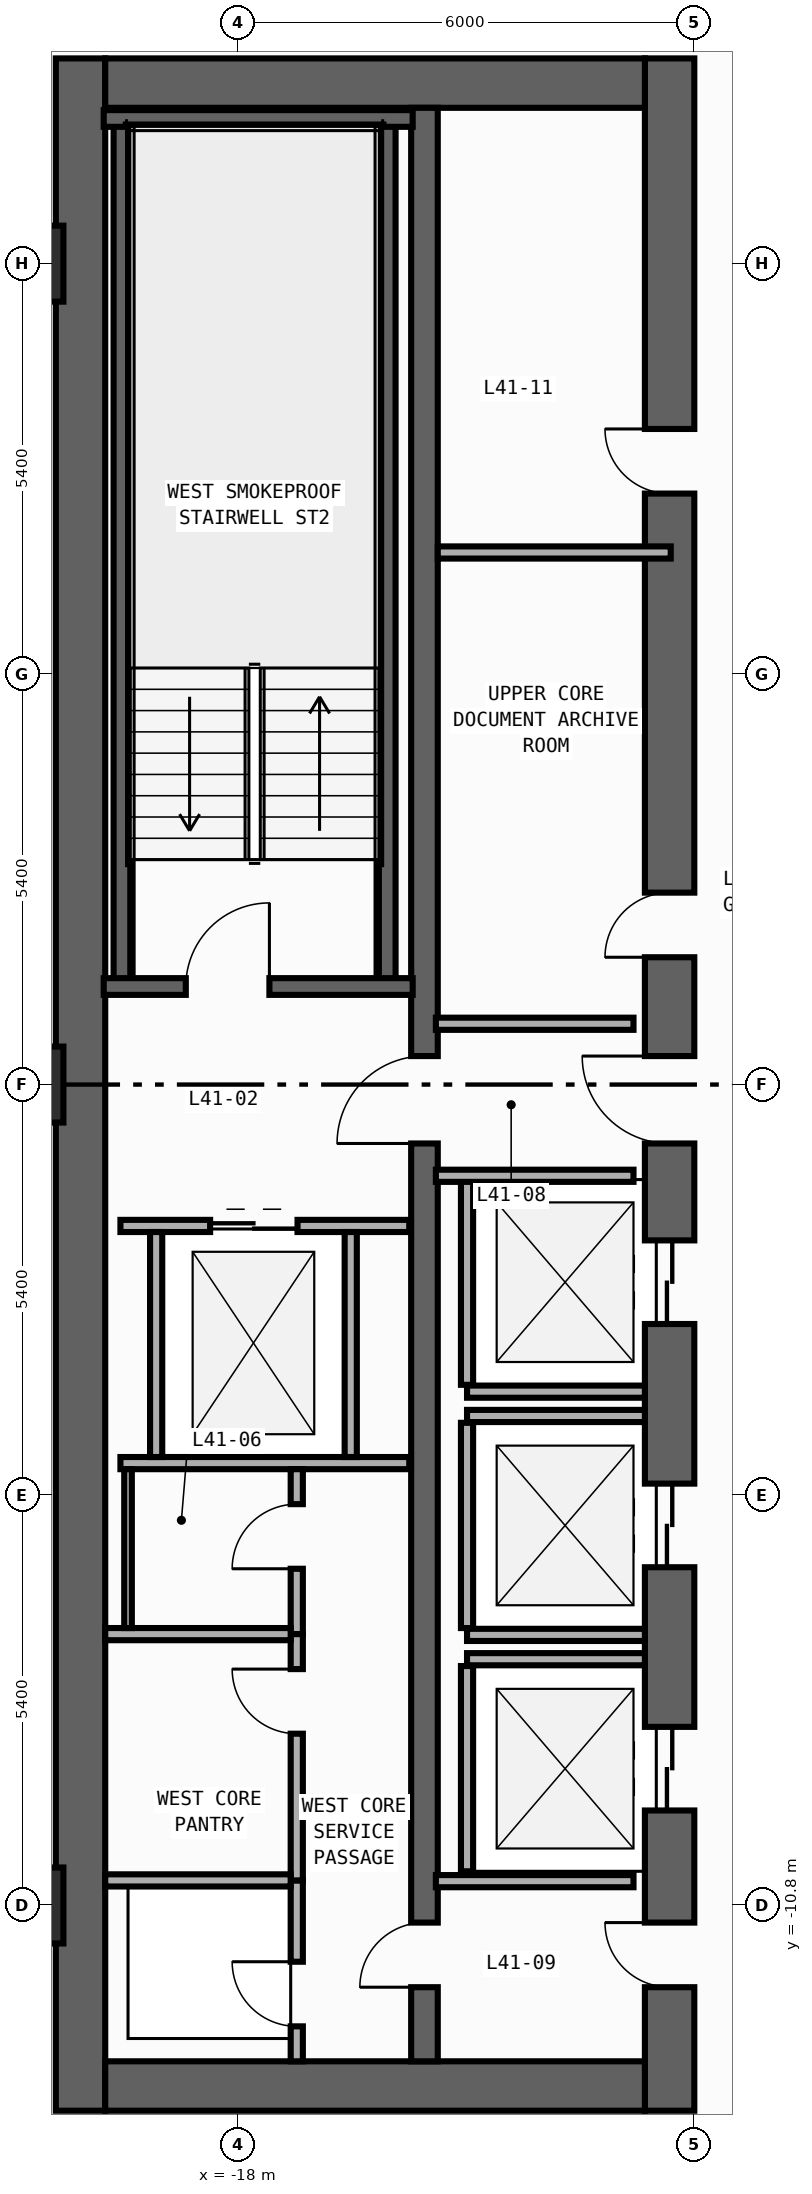
"""IFC4 building model, lengths in metres.
Left out: names, types, materials, properties, quantities, classifications, styles, units other than length and angle.
Written with IfcOpenShell. Run it as: python <this file> out.ifc"""

import sys

from ifc_helpers import new_model, si_unit, direction, frame, frame_2d, origin, origin_2d, place, context, subcontext, project, spatial, rectangle, extrude, element, fill, save


model = new_model("IFC4")
c1 = context("Model", 3, precision=1e-05, world=origin(), true_north=direction((0.0, 1.0)))
c2 = subcontext(c1, "Body", "Model", "MODEL_VIEW")
j1 = project(units=[si_unit("LENGTHUNIT", "METRE"), si_unit("PLANEANGLEUNIT", "RADIAN")], contexts=[c1])
p1 = place(None, origin())
s1 = spatial("IfcSite", under=j1, at=p1, CompositionType="ELEMENT")
p2 = place(p1, origin())
s2 = spatial("IfcBuilding", under=s1, at=p2, CompositionType="ELEMENT")
p3 = place(p2, frame((0.0, 0.0, 180.2)))
s3 = spatial("IfcBuildingStorey", under=s2, at=p3, CompositionType="ELEMENT", Elevation=180.2)
p4 = place(p3, frame((-20.075, -13.5, 0.0), z_axis=(0.0, 0.0, 1.0), x_axis=(0.0, 1.0, 0.0)))
e1 = element("IfcWall", 1, at=p4, inside=s3, PredefinedType="SHEAR", context=c2, shape_type="SweptSolid", body=[
    extrude(rectangle(XDim=27.0, YDim=0.65, at=frame_2d((13.5, 0.0))), origin(), (0.0, 0.0, 1.0), 3.54),
])
p5 = place(p3, frame((-12.325, -13.5, 0.0), z_axis=(0.0, 0.0, 1.0), x_axis=(0.0, 1.0, 0.0)))
e2 = element("IfcWall", 2, at=p5, inside=s3, PredefinedType="SHEAR", context=c2, shape_type="SweptSolid", body=[
    extrude(rectangle(XDim=27.0, YDim=0.65, at=frame_2d((13.5, 0.0))), origin(), (0.0, 0.0, 1.0), 3.54),
])
p6 = place(p5, frame((10.35, 0.0, 0.0)))
e3 = element("IfcOpeningElement", 3, at=p6, cuts=e2, PredefinedType="OPENING", context=c2, shape_type="SweptSolid", body=[
    extrude(rectangle(XDim=1.1, YDim=2.2, at=frame_2d((0.55, 1.1))), frame((0.0, 0.335, 0.0), z_axis=(0.0, -1.0, 0.0), x_axis=(1.0, 0.0, 0.0)), (0.0, 0.0, 1.0), 0.67),
])
p7 = place(p5, frame((7.15, 0.0, 0.0)))
e4 = element("IfcOpeningElement", 4, at=p7, cuts=e2, PredefinedType="OPENING", context=c2, shape_type="SweptSolid", body=[
    extrude(rectangle(XDim=1.1, YDim=2.2, at=frame_2d((0.55, 1.1))), frame((0.0, 0.335, 0.0), z_axis=(0.0, -1.0, 0.0), x_axis=(1.0, 0.0, 0.0)), (0.0, 0.0, 1.0), 0.67),
])
p8 = place(p5, frame((3.95, 0.0, 0.0)))
e5 = element("IfcOpeningElement", 5, at=p8, cuts=e2, PredefinedType="OPENING", context=c2, shape_type="SweptSolid", body=[
    extrude(rectangle(XDim=1.1, YDim=2.2, at=frame_2d((0.55, 1.1))), frame((0.0, 0.335, 0.0), z_axis=(0.0, -1.0, 0.0), x_axis=(1.0, 0.0, 0.0)), (0.0, 0.0, 1.0), 0.67),
])
p9 = place(p5, frame((15.175, 0.0, 0.0)))
e6 = element("IfcOpeningElement", 6, at=p9, cuts=e2, PredefinedType="OPENING", context=c2, shape_type="SweptSolid", body=[
    extrude(rectangle(XDim=0.85, YDim=2.1, at=frame_2d((0.425, 1.05))), frame((0.0, 0.335, 0.0), z_axis=(0.0, -1.0, 0.0), x_axis=(1.0, 0.0, 0.0)), (0.0, 0.0, 1.0), 0.67),
])
p10 = place(p5, frame((21.275, 0.0, 0.0)))
e7 = element("IfcOpeningElement", 7, at=p10, cuts=e2, PredefinedType="OPENING", context=c2, shape_type="SweptSolid", body=[
    extrude(rectangle(XDim=0.85, YDim=2.1, at=frame_2d((0.425, 1.05))), frame((0.0, 0.335, 0.0), z_axis=(0.0, -1.0, 0.0), x_axis=(1.0, 0.0, 0.0)), (0.0, 0.0, 1.0), 0.67),
])
p11 = place(p5, frame((12.725, 0.0, 0.0)))
e8 = element("IfcOpeningElement", 8, at=p11, cuts=e2, PredefinedType="OPENING", context=c2, shape_type="SweptSolid", body=[
    extrude(rectangle(XDim=1.15, YDim=2.2, at=frame_2d((0.575, 1.1))), frame((0.0, 0.335, 0.0), z_axis=(0.0, -1.0, 0.0), x_axis=(1.0, 0.0, 0.0)), (0.0, 0.0, 1.0), 0.67),
])
p12 = place(p5, frame((1.625, 0.0, 0.0)))
e9 = element("IfcOpeningElement", 9, at=p12, cuts=e2, PredefinedType="OPENING", context=c2, shape_type="SweptSolid", body=[
    extrude(rectangle(XDim=0.85, YDim=2.1, at=frame_2d((0.425, 1.05))), frame((0.0, 0.335, 0.0), z_axis=(0.0, -1.0, 0.0), x_axis=(1.0, 0.0, 0.0)), (0.0, 0.0, 1.0), 0.67),
])
for number, where, z_axis, x_axis in (
    (10, (-19.75, -13.175, 0.0), (0.0, 0.0, 1.0), (1.0, 0.0, 0.0)),
    (11, (-19.75, 13.175, 0.0), (0.0, 0.0, 1.0), (1.0, 0.0, 0.0)),
):
    element("IfcWall", number, at=place(p3, frame(where, z_axis=z_axis, x_axis=x_axis)), inside=s3, PredefinedType="SHEAR", context=c2, shape_type="SweptSolid", body=[
        extrude(rectangle(XDim=7.1, YDim=0.65, at=frame_2d((3.55, 0.0))), origin(), (0.0, 0.0, 1.0), 3.54),
    ])
p13 = place(p3, frame((-15.55, -12.85, 0.0), z_axis=(0.0, 0.0, 1.0), x_axis=(0.0, 1.0, 0.0)))
e12 = element("IfcWall", 12, at=p13, inside=s3, PredefinedType="SHEAR", context=c2, shape_type="SweptSolid", body=[
    extrude(rectangle(XDim=25.7, YDim=0.35, at=frame_2d((12.85, 0.0))), origin(), (0.0, 0.0, 1.0), 3.54),
])
p14 = place(p13, frame((12.075, 0.0, 0.0)))
e13 = element("IfcOpeningElement", 13, at=p14, cuts=e12, PredefinedType="OPENING", context=c2, shape_type="SweptSolid", body=[
    extrude(rectangle(XDim=1.15, YDim=2.2, at=frame_2d((0.575, 1.1))), frame((0.0, 0.185, 0.0), z_axis=(0.0, -1.0, 0.0), x_axis=(1.0, 0.0, 0.0)), (0.0, 0.0, 1.0), 0.37),
])
p15 = place(p13, frame((0.975, 0.0, 0.0)))
e14 = element("IfcOpeningElement", 14, at=p15, cuts=e12, PredefinedType="OPENING", context=c2, shape_type="SweptSolid", body=[
    extrude(rectangle(XDim=0.85, YDim=2.1, at=frame_2d((0.425, 1.05))), frame((0.0, 0.185, 0.0), z_axis=(0.0, -1.0, 0.0), x_axis=(1.0, 0.0, 0.0)), (0.0, 0.0, 1.0), 0.37),
])
for number, where, z_axis, x_axis in (
    (15, (-16.04, 1.29, 0.0), (0.0, 0.0, 1.0), (0.0, 1.0, 0.0)),
    (16, (-19.53, 1.29, 0.0), (0.0, 0.0, 1.0), (0.0, 1.0, 0.0)),
):
    element("IfcWall", number, at=place(p3, frame(where, z_axis=z_axis, x_axis=x_axis)), inside=s3, PredefinedType="SHEAR", context=c2, shape_type="SweptSolid", body=[
        extrude(rectangle(XDim=11.42, YDim=0.22, at=frame_2d((5.71, 0.0))), origin(), (0.0, 0.0, 1.0), 3.54),
    ])
p16 = place(p3, frame((-19.77, 12.71, 0.0), z_axis=(0.0, 0.0, 1.0), x_axis=(1.0, 0.0, 0.0)))
e17 = element("IfcWall", 17, at=p16, inside=s3, PredefinedType="SHEAR", context=c2, shape_type="SweptSolid", body=[
    extrude(rectangle(XDim=4.065, YDim=0.22, at=frame_2d((2.032, 0.0))), origin(), (0.0, 0.0, 1.0), 3.54),
])
p17 = place(p3, frame((-19.77, 1.29, 0.0), z_axis=(0.0, 0.0, 1.0), x_axis=(1.0, 0.0, 0.0)))
e18 = element("IfcWall", 18, at=p17, inside=s3, PredefinedType="SHEAR", context=c2, shape_type="SweptSolid", body=[
    extrude(rectangle(XDim=4.065, YDim=0.22, at=frame_2d((2.032, 0.0))), origin(), (0.0, 0.0, 1.0), 3.54),
])
p18 = place(p17, frame((1.08, 0.0, 0.0)))
e19 = element("IfcOpeningElement", 19, at=p18, cuts=e18, PredefinedType="OPENING", context=c2, shape_type="SweptSolid", body=[
    extrude(rectangle(XDim=1.1, YDim=2.2, at=frame_2d((0.55, 1.1))), frame((0.0, 0.12, 0.0), z_axis=(0.0, -1.0, 0.0), x_axis=(1.0, 0.0, 0.0)), (0.0, 0.0, 1.0), 0.24),
])
for number, where, z_axis, x_axis in (
    (20, (-20.8, -10.8, 0.0), (0.0, 0.0, 1.0), (1.0, 0.0, 0.0)),
    (21, (-20.8, 0.0, 0.0), (0.0, 0.0, 1.0), (1.0, 0.0, 0.0)),
    (22, (-20.8, 10.8, 0.0), (0.0, 0.0, 1.0), (1.0, 0.0, 0.0)),
):
    element("IfcColumn", number, at=place(p3, frame(where, z_axis=z_axis, x_axis=x_axis)), inside=s3, PredefinedType="COLUMN", context=c2, shape_type="SweptSolid", body=[
        extrude(rectangle(XDim=1.0, YDim=1.0, at=origin_2d()), origin(), (0.0, 0.0, 1.0), 3.8),
    ])
p19 = place(p3, frame((-14.99, -4.04, 0.0), z_axis=(0.0, 0.0, 1.0), x_axis=(1.0, 0.0, 0.0)))
e23 = element("IfcWall", 23, at=p19, inside=s3, PredefinedType="STANDARD", context=c2, shape_type="SweptSolid", body=[
    extrude(rectangle(XDim=2.34, YDim=0.16, at=frame_2d((1.17, 0.0))), origin(), (0.0, 0.0, 1.0), 3.54),
])
p20 = place(p3, frame((-14.99, -3.95, 0.0), z_axis=(0.0, 0.0, 1.0), x_axis=(0.0, 1.0, 0.0)))
e24 = element("IfcWall", 24, at=p20, inside=s3, PredefinedType="STANDARD", context=c2, shape_type="SweptSolid", body=[
    extrude(rectangle(XDim=2.7, YDim=0.16, at=frame_2d((1.35, 0.0))), origin(), (0.0, 0.0, 1.0), 3.54),
])
for number, where, z_axis, x_axis in (
    (25, (-14.99, -7.24, 0.0), (0.0, 0.0, 1.0), (1.0, 0.0, 0.0)),
    (26, (-14.99, -4.36, 0.0), (0.0, 0.0, 1.0), (1.0, 0.0, 0.0)),
):
    element("IfcWall", number, at=place(p3, frame(where, z_axis=z_axis, x_axis=x_axis)), inside=s3, PredefinedType="STANDARD", context=c2, shape_type="SweptSolid", body=[
        extrude(rectangle(XDim=2.34, YDim=0.16, at=frame_2d((1.17, 0.0))), origin(), (0.0, 0.0, 1.0), 3.54),
    ])
p21 = place(p3, frame((-14.99, -7.15, 0.0), z_axis=(0.0, 0.0, 1.0), x_axis=(0.0, 1.0, 0.0)))
e27 = element("IfcWall", 27, at=p21, inside=s3, PredefinedType="STANDARD", context=c2, shape_type="SweptSolid", body=[
    extrude(rectangle(XDim=2.7, YDim=0.16, at=frame_2d((1.35, 0.0))), origin(), (0.0, 0.0, 1.0), 3.54),
])
p22 = place(p3, frame((-14.99, -7.56, 0.0), z_axis=(0.0, 0.0, 1.0), x_axis=(1.0, 0.0, 0.0)))
e28 = element("IfcWall", 28, at=p22, inside=s3, PredefinedType="STANDARD", context=c2, shape_type="SweptSolid", body=[
    extrude(rectangle(XDim=2.34, YDim=0.16, at=frame_2d((1.17, 0.0))), origin(), (0.0, 0.0, 1.0), 3.54),
])
p23 = place(p3, frame((-14.99, -10.35, 0.0), z_axis=(0.0, 0.0, 1.0), x_axis=(0.0, 1.0, 0.0)))
e29 = element("IfcWall", 29, at=p23, inside=s3, PredefinedType="STANDARD", context=c2, shape_type="SweptSolid", body=[
    extrude(rectangle(XDim=2.7, YDim=0.16, at=frame_2d((1.35, 0.0))), origin(), (0.0, 0.0, 1.0), 3.54),
])
p24 = place(p3, frame((-19.55, -1.86, 0.0), z_axis=(0.0, 0.0, 1.0), x_axis=(1.0, 0.0, 0.0)))
e30 = element("IfcWall", 30, at=p24, inside=s3, PredefinedType="STANDARD", context=c2, shape_type="SweptSolid", body=[
    extrude(rectangle(XDim=3.8, YDim=0.16, at=frame_2d((1.9, 0.0))), origin(), (0.0, 0.0, 1.0), 3.54),
])
p25 = place(p24, frame((1.18, 0.0, 0.0)))
e31 = element("IfcOpeningElement", 31, at=p25, cuts=e30, PredefinedType="OPENING", context=c2, shape_type="SweptSolid", body=[
    extrude(rectangle(XDim=1.15, YDim=2.2, at=frame_2d((0.575, 1.1))), frame((0.0, 0.09, 0.0), z_axis=(0.0, -1.0, 0.0), x_axis=(1.0, 0.0, 0.0)), (0.0, 0.0, 1.0), 0.18),
])
p26 = place(p3, frame((-19.55, -4.98, 0.0), z_axis=(0.0, 0.0, 1.0), x_axis=(1.0, 0.0, 0.0)))
e32 = element("IfcWall", 32, at=p26, inside=s3, PredefinedType="STANDARD", context=c2, shape_type="SweptSolid", body=[
    extrude(rectangle(XDim=3.8, YDim=0.16, at=frame_2d((1.9, 0.0))), origin(), (0.0, 0.0, 1.0), 3.54),
])
for number, where, z_axis, x_axis in (
    (33, (-19.08, -4.9, 0.0), (0.0, 0.0, 1.0), (0.0, 1.0, 0.0)),
    (34, (-16.52, -4.9, 0.0), (0.0, 0.0, 1.0), (0.0, 1.0, 0.0)),
):
    element("IfcWall", number, at=place(p3, frame(where, z_axis=z_axis, x_axis=x_axis)), inside=s3, PredefinedType="STANDARD", context=c2, shape_type="SweptSolid", body=[
        extrude(rectangle(XDim=2.96, YDim=0.16, at=frame_2d((1.48, 0.0))), origin(), (0.0, 0.0, 1.0), 3.54),
    ])
for number, where, z_axis, x_axis in (
    (35, (-15.4, 0.8, 0.0), (0.0, 0.0, 1.0), (1.0, 0.0, 0.0)),
    (36, (-15.4, -1.2, 0.0), (0.0, 0.0, 1.0), (1.0, 0.0, 0.0)),
    (37, (-15.4, -10.48, 0.0), (0.0, 0.0, 1.0), (1.0, 0.0, 0.0)),
):
    element("IfcWall", number, at=place(p3, frame(where, z_axis=z_axis, x_axis=x_axis)), inside=s3, PredefinedType="STANDARD", context=c2, shape_type="SweptSolid", body=[
        extrude(rectangle(XDim=2.6, YDim=0.16, at=frame_2d((1.3, 0.0))), origin(), (0.0, 0.0, 1.0), 3.54),
    ])
p27 = place(p3, frame((-17.23, -12.85, 0.0), z_axis=(0.0, 0.0, 1.0), x_axis=(0.0, 1.0, 0.0)))
e38 = element("IfcWall", 38, at=p27, inside=s3, PredefinedType="PARTITIONING", context=c2, shape_type="SweptSolid", body=[
    extrude(rectangle(XDim=2.38, YDim=0.16, at=frame_2d((1.19, 0.0))), origin(), (0.0, 0.0, 1.0), 3.54),
])
p28 = place(p27, frame((0.46, 0.0, 0.0)))
e39 = element("IfcOpeningElement", 39, at=p28, cuts=e38, PredefinedType="OPENING", context=c2, shape_type="SweptSolid", body=[
    extrude(rectangle(XDim=0.85, YDim=2.1, at=frame_2d((0.425, 1.05))), frame((0.0, 0.09, 0.0), z_axis=(0.0, -1.0, 0.0), x_axis=(1.0, 0.0, 0.0)), (0.0, 0.0, 1.0), 0.18),
])
p29 = place(p3, frame((-17.23, -7.23, 0.0), z_axis=(0.0, 0.0, 1.0), x_axis=(0.0, 1.0, 0.0)))
e40 = element("IfcWall", 40, at=p29, inside=s3, PredefinedType="PARTITIONING", context=c2, shape_type="SweptSolid", body=[
    extrude(rectangle(XDim=2.17, YDim=0.16, at=frame_2d((1.085, 0.0))), origin(), (0.0, 0.0, 1.0), 3.54),
])
p30 = place(p29, frame((0.86, 0.0, 0.0)))
e41 = element("IfcOpeningElement", 41, at=p30, cuts=e40, PredefinedType="OPENING", context=c2, shape_type="SweptSolid", body=[
    extrude(rectangle(XDim=0.85, YDim=2.1, at=frame_2d((0.425, 1.05))), frame((0.0, 0.09, 0.0), z_axis=(0.0, -1.0, 0.0), x_axis=(1.0, 0.0, 0.0)), (0.0, 0.0, 1.0), 0.18),
])
p31 = place(p3, frame((-17.23, -10.47, 0.0), z_axis=(0.0, 0.0, 1.0), x_axis=(0.0, 1.0, 0.0)))
e42 = element("IfcWall", 42, at=p31, inside=s3, PredefinedType="PARTITIONING", context=c2, shape_type="SweptSolid", body=[
    extrude(rectangle(XDim=3.24, YDim=0.16, at=frame_2d((1.62, 0.0))), origin(), (0.0, 0.0, 1.0), 3.54),
])
p32 = place(p31, frame((1.93, 0.0, 0.0)))
e43 = element("IfcOpeningElement", 43, at=p32, cuts=e42, PredefinedType="OPENING", context=c2, shape_type="SweptSolid", body=[
    extrude(rectangle(XDim=0.85, YDim=2.1, at=frame_2d((0.425, 1.05))), frame((0.0, 0.09, 0.0), z_axis=(0.0, -1.0, 0.0), x_axis=(1.0, 0.0, 0.0)), (0.0, 0.0, 1.0), 0.18),
])
for number, where, z_axis, x_axis in (
    (44, (-19.75, -10.47, 0.0), (0.0, 0.0, 1.0), (1.0, 0.0, 0.0)),
    (45, (-19.75, -7.23, 0.0), (0.0, 0.0, 1.0), (1.0, 0.0, 0.0)),
):
    element("IfcWall", number, at=place(p3, frame(where, z_axis=z_axis, x_axis=x_axis)), inside=s3, PredefinedType="PARTITIONING", context=c2, shape_type="SweptSolid", body=[
        extrude(rectangle(XDim=2.44, YDim=0.16, at=frame_2d((1.22, 0.0))), origin(), (0.0, 0.0, 1.0), 3.54),
    ])
p33 = place(p3, frame((-15.375, 7.0, 0.0), z_axis=(0.0, 0.0, 1.0), x_axis=(1.0, 0.0, 0.0)))
e46 = element("IfcWall", 46, at=p33, inside=s3, PredefinedType="PARTITIONING", context=c2, shape_type="SweptSolid", body=[
    extrude(rectangle(XDim=3.065, YDim=0.16, at=frame_2d((1.532, 0.0))), origin(), (0.0, 0.0, 1.0), 3.54),
])
p34 = place(p3, frame((-19.45, -7.15, 0.0), z_axis=(0.0, 0.0, 1.0), x_axis=(0.0, 1.0, 0.0)))
e47 = element("IfcWall", 47, at=p34, inside=s3, PredefinedType="PARTITIONING", context=c2, shape_type="SweptSolid", body=[
    extrude(rectangle(XDim=2.09, YDim=0.1, at=frame_2d((1.045, 0.0))), origin(), (0.0, 0.0, 1.0), 3.54),
])
p35 = place(p18, origin())
e48 = element("IfcDoor", 48, at=p35, inside=s3, OperationType="SINGLE_SWING_RIGHT", PredefinedType="DOOR", context=c2, shape_type="SweptSolid", body=[
    extrude(rectangle(XDim=1.1, YDim=2.2, at=frame_2d((0.55, 1.1))), frame((0.0, 0.025, 0.0), z_axis=(0.0, -1.0, 0.0), x_axis=(1.0, 0.0, 0.0)), (0.0, 0.0, 1.0), 0.05),
])
fill(e19, e48)
p36 = place(p6, origin())
e49 = element("IfcDoor", 49, at=p36, inside=s3, OperationType="DOUBLE_DOOR_SLIDING", PredefinedType="DOOR", context=c2, shape_type="SweptSolid", body=[
    extrude(rectangle(XDim=1.1, YDim=2.2, at=frame_2d((0.55, 1.1))), frame((0.0, 0.025, 0.0), z_axis=(0.0, -1.0, 0.0), x_axis=(1.0, 0.0, 0.0)), (0.0, 0.0, 1.0), 0.05),
])
fill(e3, e49)
p37 = place(p7, origin())
e50 = element("IfcDoor", 50, at=p37, inside=s3, OperationType="DOUBLE_DOOR_SLIDING", PredefinedType="DOOR", context=c2, shape_type="SweptSolid", body=[
    extrude(rectangle(XDim=1.1, YDim=2.2, at=frame_2d((0.55, 1.1))), frame((0.0, 0.025, 0.0), z_axis=(0.0, -1.0, 0.0), x_axis=(1.0, 0.0, 0.0)), (0.0, 0.0, 1.0), 0.05),
])
fill(e4, e50)
p38 = place(p8, origin())
e51 = element("IfcDoor", 51, at=p38, inside=s3, OperationType="DOUBLE_DOOR_SLIDING", PredefinedType="DOOR", context=c2, shape_type="SweptSolid", body=[
    extrude(rectangle(XDim=1.1, YDim=2.2, at=frame_2d((0.55, 1.1))), frame((0.0, 0.025, 0.0), z_axis=(0.0, -1.0, 0.0), x_axis=(1.0, 0.0, 0.0)), (0.0, 0.0, 1.0), 0.05),
])
fill(e5, e51)
p39 = place(p9, origin())
e52 = element("IfcDoor", 52, at=p39, inside=s3, OperationType="SINGLE_SWING_LEFT", PredefinedType="DOOR", context=c2, shape_type="SweptSolid", body=[
    extrude(rectangle(XDim=0.85, YDim=2.1, at=frame_2d((0.425, 1.05))), frame((0.0, 0.025, 0.0), z_axis=(0.0, -1.0, 0.0), x_axis=(1.0, 0.0, 0.0)), (0.0, 0.0, 1.0), 0.05),
])
fill(e6, e52)
p40 = place(p10, origin())
e53 = element("IfcDoor", 53, at=p40, inside=s3, OperationType="SINGLE_SWING_RIGHT", PredefinedType="DOOR", context=c2, shape_type="SweptSolid", body=[
    extrude(rectangle(XDim=0.85, YDim=2.1, at=frame_2d((0.425, 1.05))), frame((0.0, 0.025, 0.0), z_axis=(0.0, -1.0, 0.0), x_axis=(1.0, 0.0, 0.0)), (0.0, 0.0, 1.0), 0.05),
])
fill(e7, e53)
p41 = place(p11, origin())
e54 = element("IfcDoor", 54, at=p41, inside=s3, OperationType="SINGLE_SWING_RIGHT", PredefinedType="DOOR", context=c2, shape_type="SweptSolid", body=[
    extrude(rectangle(XDim=1.15, YDim=2.2, at=frame_2d((0.575, 1.1))), frame((0.0, 0.025, 0.0), z_axis=(0.0, -1.0, 0.0), x_axis=(1.0, 0.0, 0.0)), (0.0, 0.0, 1.0), 0.05),
])
fill(e8, e54)
p42 = place(p14, origin())
e55 = element("IfcDoor", 55, at=p42, inside=s3, OperationType="SINGLE_SWING_LEFT", PredefinedType="DOOR", context=c2, shape_type="SweptSolid", body=[
    extrude(rectangle(XDim=1.15, YDim=2.2, at=frame_2d((0.575, 1.1))), frame((0.0, 0.025, 0.0), z_axis=(0.0, -1.0, 0.0), x_axis=(1.0, 0.0, 0.0)), (0.0, 0.0, 1.0), 0.05),
])
fill(e13, e55)
p43 = place(p12, origin())
e56 = element("IfcDoor", 56, at=p43, inside=s3, OperationType="SINGLE_SWING_RIGHT", PredefinedType="DOOR", context=c2, shape_type="SweptSolid", body=[
    extrude(rectangle(XDim=0.85, YDim=2.1, at=frame_2d((0.425, 1.05))), frame((0.0, 0.025, 0.0), z_axis=(0.0, -1.0, 0.0), x_axis=(1.0, 0.0, 0.0)), (0.0, 0.0, 1.0), 0.05),
])
fill(e9, e56)
p44 = place(p15, origin())
e57 = element("IfcDoor", 57, at=p44, inside=s3, OperationType="SINGLE_SWING_LEFT", PredefinedType="DOOR", context=c2, shape_type="SweptSolid", body=[
    extrude(rectangle(XDim=0.85, YDim=2.1, at=frame_2d((0.425, 1.05))), frame((0.0, 0.025, 0.0), z_axis=(0.0, -1.0, 0.0), x_axis=(1.0, 0.0, 0.0)), (0.0, 0.0, 1.0), 0.05),
])
fill(e14, e57)
p45 = place(p25, origin())
e58 = element("IfcDoor", 58, at=p45, inside=s3, OperationType="DOUBLE_DOOR_SLIDING", PredefinedType="DOOR", context=c2, shape_type="SweptSolid", body=[
    extrude(rectangle(XDim=1.15, YDim=2.2, at=frame_2d((0.575, 1.1))), frame((0.0, 0.025, 0.0), z_axis=(0.0, -1.0, 0.0), x_axis=(1.0, 0.0, 0.0)), (0.0, 0.0, 1.0), 0.05),
])
fill(e31, e58)
p46 = place(p28, origin())
e59 = element("IfcDoor", 59, at=p46, inside=s3, OperationType="SINGLE_SWING_RIGHT", PredefinedType="DOOR", context=c2, shape_type="SweptSolid", body=[
    extrude(rectangle(XDim=0.85, YDim=2.1, at=frame_2d((0.425, 1.05))), frame((0.0, 0.025, 0.0), z_axis=(0.0, -1.0, 0.0), x_axis=(1.0, 0.0, 0.0)), (0.0, 0.0, 1.0), 0.05),
])
fill(e39, e59)
p47 = place(p30, origin())
e60 = element("IfcDoor", 60, at=p47, inside=s3, OperationType="SINGLE_SWING_LEFT", PredefinedType="DOOR", context=c2, shape_type="SweptSolid", body=[
    extrude(rectangle(XDim=0.85, YDim=2.1, at=frame_2d((0.425, 1.05))), frame((0.0, 0.025, 0.0), z_axis=(0.0, -1.0, 0.0), x_axis=(1.0, 0.0, 0.0)), (0.0, 0.0, 1.0), 0.05),
])
fill(e41, e60)
p48 = place(p32, origin())
e61 = element("IfcDoor", 61, at=p48, inside=s3, OperationType="SINGLE_SWING_RIGHT", PredefinedType="DOOR", context=c2, shape_type="SweptSolid", body=[
    extrude(rectangle(XDim=0.85, YDim=2.1, at=frame_2d((0.425, 1.05))), frame((0.0, 0.025, 0.0), z_axis=(0.0, -1.0, 0.0), x_axis=(1.0, 0.0, 0.0)), (0.0, 0.0, 1.0), 0.05),
])
fill(e43, e61)
save(model, sys.argv[1])
